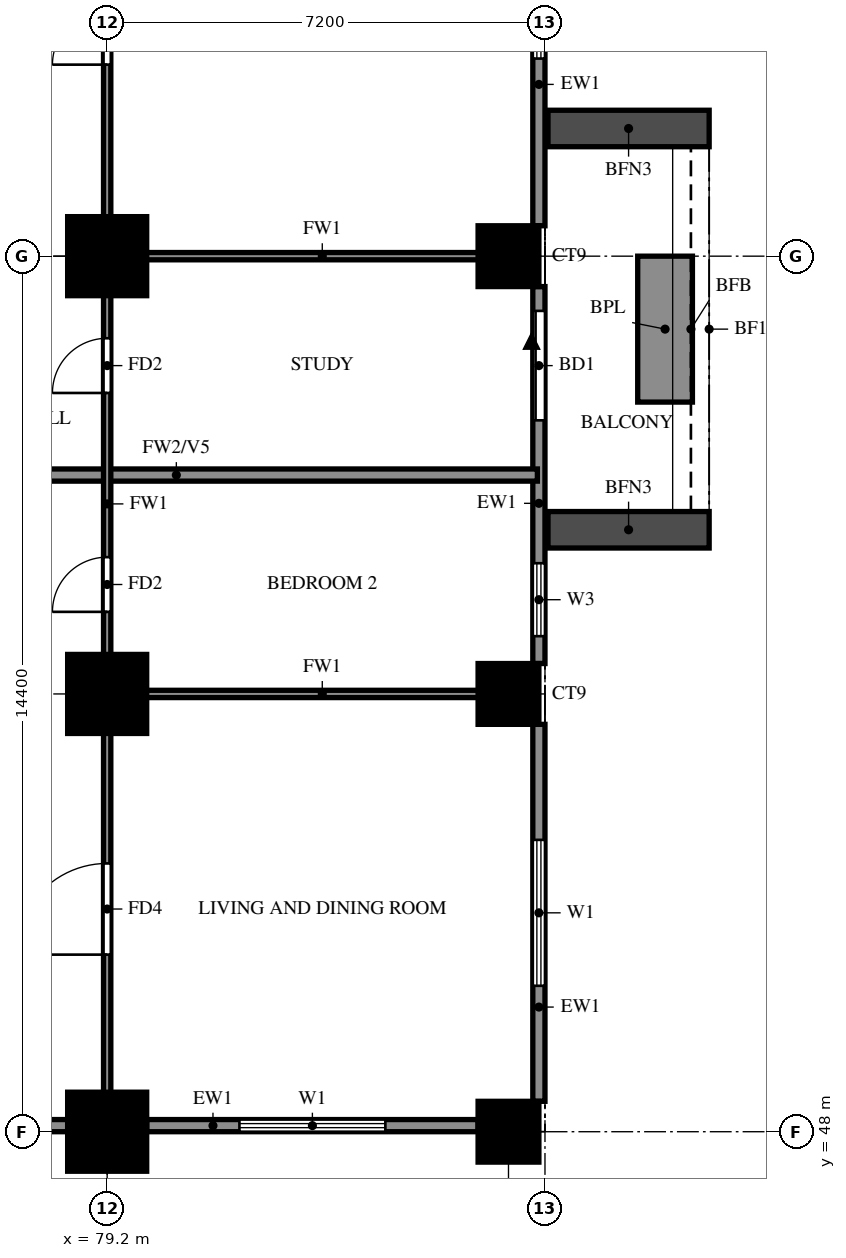
"""IFC4 building model, lengths in metres.
Left out: names, types, materials, properties, quantities, classifications, styles, units other than length and angle.
Written with IfcOpenShell. Run it as: python <this file> out.ifc"""

import sys

from ifc_helpers import new_model, si_unit, direction, frame, frame_2d, origin, origin_2d, place, context, subcontext, project, spatial, rectangle, extrude, source, transform, mapped, element, fill, save


model = new_model("IFC4")
c1 = context("Model", 3, precision=1e-05, world=origin(), true_north=direction((0.0, 1.0)))
c2 = subcontext(c1, "Body", "Model", "MODEL_VIEW")
j1 = project(units=[si_unit("LENGTHUNIT", "METRE"), si_unit("PLANEANGLEUNIT", "RADIAN")], contexts=[c1])
p1 = place(None, origin())
s1 = spatial("IfcSite", under=j1, at=p1, CompositionType="ELEMENT")
p2 = place(p1, origin())
s2 = spatial("IfcBuilding", under=s1, at=p2, CompositionType="ELEMENT")
p3 = place(p2, frame((0.0, 0.0, 83.0)))
s3 = spatial("IfcBuildingStorey", under=s2, at=p3, CompositionType="ELEMENT", Elevation=83.0)
m1 = source(origin(), c2, "Body", "SweptSolid", [
    extrude(rectangle(XDim=1.3, YDim=1.3, at=origin_2d()), origin(), (0.0, 0.0, 1.0), 3.18),
])
p4 = place(p3, frame((79.2, 48.0, 0.0), z_axis=(0.0, 0.0, 1.0), x_axis=(1.0, 0.0, 0.0)))
e1 = element("IfcColumn", 1, at=p4, inside=s3, PredefinedType="COLUMN", context=c2, shape_type="MappedRepresentation", body=[
    mapped(m1, transform((0.0, 0.0, 0.0))),
])
m2 = source(origin(), c2, "Body", "SweptSolid", [
    extrude(rectangle(XDim=1.0, YDim=1.0, at=origin_2d()), origin(), (0.0, 0.0, 1.0), 3.18),
])
p5 = place(p3, frame((85.8, 48.0, 0.0), z_axis=(0.0, 0.0, 1.0), x_axis=(1.0, 0.0, 0.0)))
e2 = element("IfcColumn", 2, at=p5, inside=s3, PredefinedType="COLUMN", context=c2, shape_type="MappedRepresentation", body=[
    mapped(m2, transform((0.0, 0.0, 0.0))),
])
p6 = place(p3, frame((79.2, 55.2, 0.0), z_axis=(0.0, 0.0, 1.0), x_axis=(1.0, 0.0, 0.0)))
e3 = element("IfcColumn", 3, at=p6, inside=s3, PredefinedType="COLUMN", context=c2, shape_type="MappedRepresentation", body=[
    mapped(m1, transform((0.0, 0.0, 0.0))),
])
p7 = place(p3, frame((85.8, 55.2, 0.0), z_axis=(0.0, 0.0, 1.0), x_axis=(1.0, 0.0, 0.0)))
e4 = element("IfcColumn", 4, at=p7, inside=s3, PredefinedType="COLUMN", context=c2, shape_type="MappedRepresentation", body=[
    mapped(m2, transform((0.0, 0.0, 0.0))),
])
p8 = place(p3, frame((79.2, 62.4, 0.0), z_axis=(0.0, 0.0, 1.0), x_axis=(1.0, 0.0, 0.0)))
e5 = element("IfcColumn", 5, at=p8, inside=s3, PredefinedType="COLUMN", context=c2, shape_type="MappedRepresentation", body=[
    mapped(m1, transform((0.0, 0.0, 0.0))),
])
p9 = place(p3, frame((85.8, 62.4, 0.0), z_axis=(0.0, 0.0, 1.0), x_axis=(1.0, 0.0, 0.0)))
e6 = element("IfcColumn", 6, at=p9, inside=s3, PredefinedType="COLUMN", context=c2, shape_type="MappedRepresentation", body=[
    mapped(m2, transform((0.0, 0.0, 0.0))),
])
p10 = place(p3, frame((85.996, 33.863, 0.0), z_axis=(0.0, 0.0, 1.0), x_axis=(-0.707100718496, 0.707112843825, 0.0)))
e7 = element("IfcWall", 7, at=p10, inside=s3, PredefinedType="SOLIDWALL", context=c2, shape_type="SweptSolid", body=[
    extrude(rectangle(XDim=20.135, YDim=0.2, at=frame_2d((10.067, 0.0))), origin(), (0.0, 0.0, 1.0), 3.18),
])
p11 = place(p3, frame((71.989, 48.1, 0.0), z_axis=(0.0, 0.0, 1.0), x_axis=(1.0, 0.0, 0.0)))
e8 = element("IfcWall", 8, at=p11, inside=s3, PredefinedType="SOLIDWALL", context=c2, shape_type="SweptSolid", body=[
    extrude(rectangle(XDim=6.562, YDim=0.2, at=frame_2d((3.281, 0.0))), origin(), (0.0, 0.0, 1.0), 3.18),
])
p12 = place(p11, frame((2.206, 0.0, 1.5)))
e9 = element("IfcOpeningElement", 9, at=p12, cuts=e8, PredefinedType="OPENING", context=c2, shape_type="SweptSolid", body=[
    extrude(rectangle(XDim=0.9, YDim=0.9, at=frame_2d((0.45, 0.45))), frame((0.0, 0.11, 0.0), z_axis=(0.0, -1.0, 0.0), x_axis=(1.0, 0.0, 0.0)), (0.0, 0.0, 1.0), 0.22),
])
p13 = place(p3, frame((79.85, 48.1, 0.0), z_axis=(0.0, 0.0, 1.0), x_axis=(1.0, 0.0, 0.0)))
e10 = element("IfcWall", 10, at=p13, inside=s3, PredefinedType="SOLIDWALL", context=c2, shape_type="SweptSolid", body=[
    extrude(rectangle(XDim=5.45, YDim=0.2, at=frame_2d((2.725, 0.0))), origin(), (0.0, 0.0, 1.0), 3.18),
])
p14 = place(p13, frame((1.525, 0.0, 0.6)))
e11 = element("IfcOpeningElement", 11, at=p14, cuts=e10, PredefinedType="OPENING", context=c2, shape_type="SweptSolid", body=[
    extrude(rectangle(XDim=2.4, YDim=2.4, at=frame_2d((1.2, 1.2))), frame((0.0, 0.11, 0.0), z_axis=(0.0, -1.0, 0.0), x_axis=(1.0, 0.0, 0.0)), (0.0, 0.0, 1.0), 0.22),
])
p15 = place(p3, frame((86.3, 48.5, 0.0), z_axis=(0.0, 0.0, 1.0), x_axis=(0.0, 1.0, 0.0)))
e12 = element("IfcWall", 12, at=p15, inside=s3, PredefinedType="SOLIDWALL", context=c2, shape_type="SweptSolid", body=[
    extrude(rectangle(XDim=6.2, YDim=0.2, at=frame_2d((3.1, 0.0))), origin(), (0.0, 0.0, 1.0), 3.18),
])
p16 = place(p15, frame((1.9, 0.0, 0.6)))
e13 = element("IfcOpeningElement", 13, at=p16, cuts=e12, PredefinedType="OPENING", context=c2, shape_type="SweptSolid", body=[
    extrude(rectangle(XDim=2.4, YDim=2.4, at=frame_2d((1.2, 1.2))), frame((0.0, 0.11, 0.0), z_axis=(0.0, -1.0, 0.0), x_axis=(1.0, 0.0, 0.0)), (0.0, 0.0, 1.0), 0.22),
])
p17 = place(p3, frame((86.3, 55.7, 0.0), z_axis=(0.0, 0.0, 1.0), x_axis=(0.0, 1.0, 0.0)))
e14 = element("IfcWall", 14, at=p17, inside=s3, PredefinedType="SOLIDWALL", context=c2, shape_type="SweptSolid", body=[
    extrude(rectangle(XDim=6.2, YDim=0.2, at=frame_2d((3.1, 0.0))), origin(), (0.0, 0.0, 1.0), 3.18),
])
p18 = place(p17, frame((4.0, 0.0, 0.0)))
e15 = element("IfcOpeningElement", 15, at=p18, cuts=e14, PredefinedType="OPENING", context=c2, shape_type="SweptSolid", body=[
    extrude(rectangle(XDim=1.8, YDim=2.4, at=frame_2d((0.9, 1.2))), frame((0.0, 0.11, 0.0), z_axis=(0.0, -1.0, 0.0), x_axis=(1.0, 0.0, 0.0)), (0.0, 0.0, 1.0), 0.22),
])
p19 = place(p17, frame((0.45, 0.0, 0.6)))
e16 = element("IfcOpeningElement", 16, at=p19, cuts=e14, PredefinedType="OPENING", context=c2, shape_type="SweptSolid", body=[
    extrude(rectangle(XDim=1.2, YDim=2.4, at=frame_2d((0.6, 1.2))), frame((0.0, 0.11, 0.0), z_axis=(0.0, -1.0, 0.0), x_axis=(1.0, 0.0, 0.0)), (0.0, 0.0, 1.0), 0.22),
])
p20 = place(p3, frame((86.3, 62.9, 0.0), z_axis=(0.0, 0.0, 1.0), x_axis=(0.0, 1.0, 0.0)))
e17 = element("IfcWall", 17, at=p20, inside=s3, PredefinedType="SOLIDWALL", context=c2, shape_type="SweptSolid", body=[
    extrude(rectangle(XDim=6.2, YDim=0.2, at=frame_2d((3.1, 0.0))), origin(), (0.0, 0.0, 1.0), 3.18),
])
p21 = place(p20, frame((2.75, 0.0, 0.6)))
e18 = element("IfcOpeningElement", 18, at=p21, cuts=e17, PredefinedType="OPENING", context=c2, shape_type="SweptSolid", body=[
    extrude(rectangle(XDim=2.4, YDim=2.4, at=frame_2d((1.2, 1.2))), frame((0.0, 0.11, 0.0), z_axis=(0.0, -1.0, 0.0), x_axis=(1.0, 0.0, 0.0)), (0.0, 0.0, 1.0), 0.22),
])
for number, where, z_axis, x_axis in (
    (19, (86.45, 57.9, 0.0), (0.0, 0.0, 1.0), (1.0, 0.0, 0.0)),
    (20, (86.45, 64.5, 0.0), (0.0, 0.0, 1.0), (1.0, 0.0, 0.0)),
):
    element("IfcWall", number, at=place(p3, frame(where, z_axis=z_axis, x_axis=x_axis)), inside=s3, PredefinedType="SOLIDWALL", context=c2, shape_type="SweptSolid", body=[
        extrude(rectangle(XDim=2.65, YDim=0.6, at=frame_2d((1.325, 0.0))), origin(), (0.0, 0.0, 1.0), 2.85),
    ])
p22 = place(p3, frame((88.375, 60.0, 0.0), z_axis=(0.0, 0.0, 1.0), x_axis=(0.0, 1.0, 0.0)))
e21 = element("IfcWall", 21, at=p22, inside=s3, PredefinedType="SOLIDWALL", context=c2, shape_type="SweptSolid", body=[
    extrude(rectangle(XDim=2.4, YDim=0.9, at=frame_2d((1.2, 0.0))), origin(), (0.0, 0.0, 1.0), 0.9),
])
p23 = place(p3, frame((74.4, 58.8, 0.0), z_axis=(0.0, 0.0, 1.0), x_axis=(1.0, 0.0, 0.0)))
e22 = element("IfcWall", 22, at=p23, inside=s3, PredefinedType="SOLIDWALL", context=c2, shape_type="SweptSolid", body=[
    extrude(rectangle(XDim=11.875, YDim=0.2, at=frame_2d((5.938, 0.0))), origin(), (0.0, 0.0, 1.0), 2.28),
])
for number, where, z_axis, x_axis in (
    (23, (79.2, 55.2, 0.0), (0.0, 0.0, 1.0), (1.0, 0.0, 0.0)),
    (24, (79.2, 62.4, 0.0), (0.0, 0.0, 1.0), (1.0, 0.0, 0.0)),
):
    element("IfcWall", number, at=place(p3, frame(where, z_axis=z_axis, x_axis=x_axis)), inside=s3, PredefinedType="PARTITIONING", context=c2, shape_type="SweptSolid", body=[
        extrude(rectangle(XDim=7.075, YDim=0.12, at=frame_2d((3.538, 0.0))), origin(), (0.0, 0.0, 1.0), 3.18),
    ])
p24 = place(p3, frame((79.2, 48.125, 0.0), z_axis=(0.0, 0.0, 1.0), x_axis=(0.0, 1.0, 0.0)))
e25 = element("IfcWall", 25, at=p24, inside=s3, PredefinedType="PARTITIONING", context=c2, shape_type="SweptSolid", body=[
    extrude(rectangle(XDim=21.475, YDim=0.12, at=frame_2d((10.738, 0.0))), origin(), (0.0, 0.0, 1.0), 3.18),
])
p25 = place(p24, frame((2.788, 0.0, 0.0)))
e26 = element("IfcOpeningElement", 26, at=p25, cuts=e25, PredefinedType="OPENING", context=c2, shape_type="SweptSolid", body=[
    extrude(rectangle(XDim=1.5, YDim=2.1, at=frame_2d((0.75, 1.05))), frame((0.0, 0.07, 0.0), z_axis=(0.0, -1.0, 0.0), x_axis=(1.0, 0.0, 0.0)), (0.0, 0.0, 1.0), 0.14),
])
p26 = place(p24, frame((8.425, 0.0, 0.0)))
e27 = element("IfcOpeningElement", 27, at=p26, cuts=e25, PredefinedType="OPENING", context=c2, shape_type="SweptSolid", body=[
    extrude(rectangle(XDim=0.9, YDim=2.1, at=frame_2d((0.45, 1.05))), frame((0.0, 0.07, 0.0), z_axis=(0.0, -1.0, 0.0), x_axis=(1.0, 0.0, 0.0)), (0.0, 0.0, 1.0), 0.14),
])
p27 = place(p24, frame((12.025, 0.0, 0.0)))
e28 = element("IfcOpeningElement", 28, at=p27, cuts=e25, PredefinedType="OPENING", context=c2, shape_type="SweptSolid", body=[
    extrude(rectangle(XDim=0.9, YDim=2.1, at=frame_2d((0.45, 1.05))), frame((0.0, 0.07, 0.0), z_axis=(0.0, -1.0, 0.0), x_axis=(1.0, 0.0, 0.0)), (0.0, 0.0, 1.0), 0.14),
])
p28 = place(p24, frame((17.425, 0.0, 0.0)))
e29 = element("IfcOpeningElement", 29, at=p28, cuts=e25, PredefinedType="OPENING", context=c2, shape_type="SweptSolid", body=[
    extrude(rectangle(XDim=0.9, YDim=2.1, at=frame_2d((0.45, 1.05))), frame((0.0, 0.07, 0.0), z_axis=(0.0, -1.0, 0.0), x_axis=(1.0, 0.0, 0.0)), (0.0, 0.0, 1.0), 0.14),
])
p29 = place(p14, origin())
e30 = element("IfcWindow", 30, at=p29, inside=s3, PartitioningType="DOUBLE_PANEL_VERTICAL", PredefinedType="WINDOW", context=c2, shape_type="SweptSolid", body=[
    extrude(rectangle(XDim=2.4, YDim=2.4, at=frame_2d((1.2, 1.2))), frame((0.0, 0.03, 0.0), z_axis=(0.0, -1.0, 0.0), x_axis=(1.0, 0.0, 0.0)), (0.0, 0.0, 1.0), 0.06),
])
fill(e11, e30)
p30 = place(p16, origin())
e31 = element("IfcWindow", 31, at=p30, inside=s3, PartitioningType="DOUBLE_PANEL_VERTICAL", PredefinedType="WINDOW", context=c2, shape_type="SweptSolid", body=[
    extrude(rectangle(XDim=2.4, YDim=2.4, at=frame_2d((1.2, 1.2))), frame((0.0, 0.03, 0.0), z_axis=(0.0, -1.0, 0.0), x_axis=(1.0, 0.0, 0.0)), (0.0, 0.0, 1.0), 0.06),
])
fill(e13, e31)
p31 = place(p18, origin())
e32 = element("IfcDoor", 32, at=p31, inside=s3, OperationType="DOUBLE_DOOR_SLIDING", PredefinedType="DOOR", context=c2, shape_type="SweptSolid", body=[
    extrude(rectangle(XDim=1.8, YDim=2.4, at=frame_2d((0.9, 1.2))), frame((0.0, 0.025, 0.0), z_axis=(0.0, -1.0, 0.0), x_axis=(1.0, 0.0, 0.0)), (0.0, 0.0, 1.0), 0.05),
])
fill(e15, e32)
p32 = place(p19, origin())
e33 = element("IfcWindow", 33, at=p32, inside=s3, PartitioningType="SINGLE_PANEL", PredefinedType="WINDOW", context=c2, shape_type="SweptSolid", body=[
    extrude(rectangle(XDim=1.2, YDim=2.4, at=frame_2d((0.6, 1.2))), frame((0.0, 0.03, 0.0), z_axis=(0.0, -1.0, 0.0), x_axis=(1.0, 0.0, 0.0)), (0.0, 0.0, 1.0), 0.06),
])
fill(e16, e33)
p33 = place(p21, origin())
e34 = element("IfcWindow", 34, at=p33, inside=s3, PartitioningType="DOUBLE_PANEL_VERTICAL", PredefinedType="WINDOW", context=c2, shape_type="SweptSolid", body=[
    extrude(rectangle(XDim=2.4, YDim=2.4, at=frame_2d((1.2, 1.2))), frame((0.0, 0.03, 0.0), z_axis=(0.0, -1.0, 0.0), x_axis=(1.0, 0.0, 0.0)), (0.0, 0.0, 1.0), 0.06),
])
fill(e18, e34)
p34 = place(p25, origin())
e35 = element("IfcDoor", 35, at=p34, inside=s3, OperationType="SINGLE_SWING_RIGHT", PredefinedType="DOOR", context=c2, shape_type="SweptSolid", body=[
    extrude(rectangle(XDim=1.5, YDim=2.1, at=frame_2d((0.75, 1.05))), frame((0.0, 0.025, 0.0), z_axis=(0.0, -1.0, 0.0), x_axis=(1.0, 0.0, 0.0)), (0.0, 0.0, 1.0), 0.05),
])
fill(e26, e35)
p35 = place(p26, origin())
e36 = element("IfcDoor", 36, at=p35, inside=s3, OperationType="SINGLE_SWING_LEFT", PredefinedType="DOOR", context=c2, shape_type="SweptSolid", body=[
    extrude(rectangle(XDim=0.9, YDim=2.1, at=frame_2d((0.45, 1.05))), frame((0.0, 0.025, 0.0), z_axis=(0.0, -1.0, 0.0), x_axis=(1.0, 0.0, 0.0)), (0.0, 0.0, 1.0), 0.05),
])
fill(e27, e36)
p36 = place(p27, origin())
e37 = element("IfcDoor", 37, at=p36, inside=s3, OperationType="SINGLE_SWING_LEFT", PredefinedType="DOOR", context=c2, shape_type="SweptSolid", body=[
    extrude(rectangle(XDim=0.9, YDim=2.1, at=frame_2d((0.45, 1.05))), frame((0.0, 0.025, 0.0), z_axis=(0.0, -1.0, 0.0), x_axis=(1.0, 0.0, 0.0)), (0.0, 0.0, 1.0), 0.05),
])
fill(e28, e37)
p37 = place(p28, origin())
e38 = element("IfcDoor", 38, at=p37, inside=s3, OperationType="SINGLE_SWING_LEFT", PredefinedType="DOOR", context=c2, shape_type="SweptSolid", body=[
    extrude(rectangle(XDim=0.9, YDim=2.1, at=frame_2d((0.45, 1.05))), frame((0.0, 0.025, 0.0), z_axis=(0.0, -1.0, 0.0), x_axis=(1.0, 0.0, 0.0)), (0.0, 0.0, 1.0), 0.05),
])
fill(e29, e38)
save(model, sys.argv[1])
